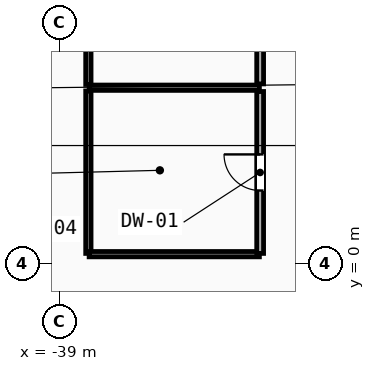
"""IFC4 building model, lengths in metres.
Left out: names, types, materials, properties, quantities, classifications, styles, units other than length and angle.
Written with IfcOpenShell. Run it as: python <this file> out.ifc"""

import sys

from ifc_helpers import new_model, si_unit, direction, frame, frame_2d, origin, place, context, subcontext, project, spatial, rectangle, extrude, element, fill, save


model = new_model("IFC4")
c1 = context("Model", 3, precision=1e-05, world=origin(), true_north=direction((0.0, 1.0)))
c2 = subcontext(c1, "Body", "Model", "MODEL_VIEW")
j1 = project(units=[si_unit("LENGTHUNIT", "METRE"), si_unit("PLANEANGLEUNIT", "RADIAN")], contexts=[c1])
p1 = place(None, origin())
s1 = spatial("IfcSite", under=j1, at=p1, CompositionType="ELEMENT")
p2 = place(p1, origin())
s2 = spatial("IfcBuilding", under=s1, at=p2, CompositionType="ELEMENT")
p3 = place(p2, frame((0.0, 0.0, 227.8)))
s3 = spatial("IfcBuildingStorey", under=s2, at=p3, CompositionType="ELEMENT", Elevation=227.8)
p4 = place(p3, frame((-38.24, 0.27, 0.0), z_axis=(0.0, 0.0, 1.0), x_axis=(0.0, 1.0, 0.0)))
e1 = element("IfcWall", 1, at=p4, inside=s3, PredefinedType="PARTITIONING", context=c2, shape_type="SweptSolid", body=[
    extrude(rectangle(XDim=4.275, YDim=0.14, at=frame_2d((2.137, 0.0))), origin(), (0.0, 0.0, 1.0), 3.34),
])
p5 = place(p3, frame((-38.24, 4.715, 0.0), z_axis=(0.0, 0.0, 1.0), x_axis=(0.0, 1.0, 0.0)))
e2 = element("IfcWall", 2, at=p5, inside=s3, PredefinedType="PARTITIONING", context=c2, shape_type="SweptSolid", body=[
    extrude(rectangle(XDim=4.175, YDim=0.14, at=frame_2d((2.087, 0.0))), origin(), (0.0, 0.0, 1.0), 3.34),
])
for number, where, z_axis, x_axis in (
    (3, (-38.22, 0.25, 0.0), (0.0, 0.0, 1.0), (1.0, 0.0, 0.0)),
    (4, (-38.22, 4.63, 0.0), (0.0, 0.0, 1.0), (1.0, 0.0, 0.0)),
):
    element("IfcWall", number, at=place(p3, frame(where, z_axis=z_axis, x_axis=x_axis)), inside=s3, PredefinedType="PARTITIONING", context=c2, shape_type="SweptSolid", body=[
        extrude(rectangle(XDim=4.48, YDim=0.14, at=frame_2d((2.24, 0.0))), origin(), (0.0, 0.0, 1.0), 3.34),
    ])
p6 = place(p3, frame((-33.72, 0.27, 0.0), z_axis=(0.0, 0.0, 1.0), x_axis=(0.0, 1.0, 0.0)))
e5 = element("IfcWall", 5, at=p6, inside=s3, PredefinedType="PARTITIONING", context=c2, shape_type="SweptSolid", body=[
    extrude(rectangle(XDim=4.26, YDim=0.18, at=frame_2d((2.13, 0.0))), origin(), (0.0, 0.0, 1.0), 3.34),
])
p7 = place(p6, frame((1.655, 0.0, 0.0)))
e6 = element("IfcOpeningElement", 6, at=p7, cuts=e5, PredefinedType="OPENING", context=c2, shape_type="SweptSolid", body=[
    extrude(rectangle(XDim=0.95, YDim=2.1, at=frame_2d((0.475, 1.05))), frame((0.0, 0.1, 0.0), z_axis=(0.0, -1.0, 0.0), x_axis=(1.0, 0.0, 0.0)), (0.0, 0.0, 1.0), 0.2),
])
p8 = place(p3, frame((-33.72, 4.73, 0.0), z_axis=(0.0, 0.0, 1.0), x_axis=(0.0, 1.0, 0.0)))
e7 = element("IfcWall", 7, at=p8, inside=s3, PredefinedType="PARTITIONING", context=c2, shape_type="SweptSolid", body=[
    extrude(rectangle(XDim=4.16, YDim=0.18, at=frame_2d((2.08, 0.0))), origin(), (0.0, 0.0, 1.0), 3.34),
])
p9 = place(p8, frame((1.58, 0.0, 0.0)))
e8 = element("IfcOpeningElement", 8, at=p9, cuts=e7, PredefinedType="OPENING", context=c2, shape_type="SweptSolid", body=[
    extrude(rectangle(XDim=1.0, YDim=2.15, at=frame_2d((0.5, 1.075))), frame((0.0, 0.1, 0.0), z_axis=(0.0, -1.0, 0.0), x_axis=(1.0, 0.0, 0.0)), (0.0, 0.0, 1.0), 0.2),
])
p10 = place(p7, origin())
e9 = element("IfcDoor", 9, at=p10, inside=s3, OperationType="SINGLE_SWING_RIGHT", PredefinedType="DOOR", context=c2, shape_type="SweptSolid", body=[
    extrude(rectangle(XDim=0.95, YDim=2.1, at=frame_2d((0.475, 1.05))), frame((0.0, 0.025, 0.0), z_axis=(0.0, -1.0, 0.0), x_axis=(1.0, 0.0, 0.0)), (0.0, 0.0, 1.0), 0.05),
])
fill(e6, e9)
save(model, sys.argv[1])
